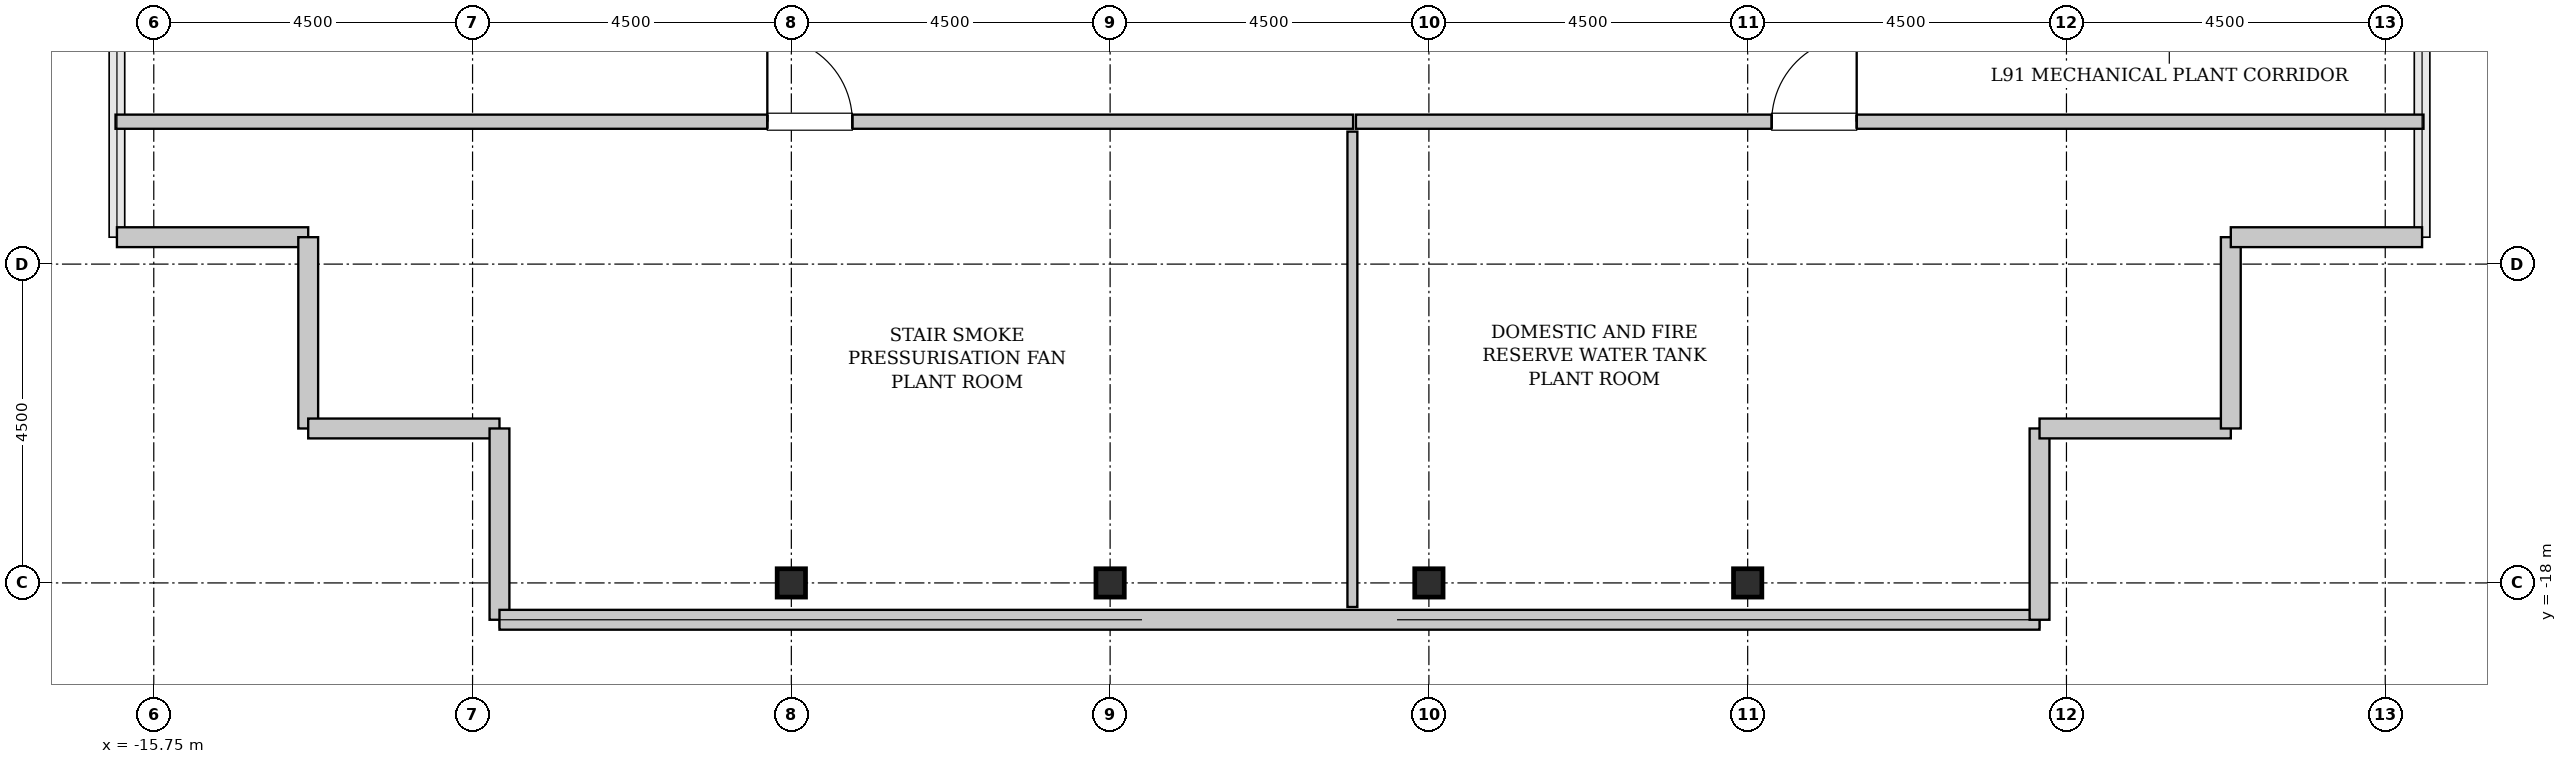
"""IFC4 building model, lengths in metres.
Left out: names, types, materials, properties, quantities, classifications, styles, units other than length and angle.
Written with IfcOpenShell. Run it as: python <this file> out.ifc"""

import sys

from ifc_helpers import new_model, si_unit, direction, frame, frame_2d, origin, origin_2d, place, context, subcontext, project, spatial, rectangle, hollow_rectangle, extrude, source, transform, mapped, element, fill, save


model = new_model("IFC4")
c1 = context("Model", 3, precision=1e-05, world=origin(), true_north=direction((0.0, 1.0)))
c2 = subcontext(c1, "Body", "Model", "MODEL_VIEW")
j1 = project(units=[si_unit("LENGTHUNIT", "METRE"), si_unit("PLANEANGLEUNIT", "RADIAN")], contexts=[c1])
p1 = place(None, origin())
s1 = spatial("IfcSite", under=j1, at=p1, CompositionType="ELEMENT")
p2 = place(p1, origin())
s2 = spatial("IfcBuilding", under=s1, at=p2, CompositionType="ELEMENT")
p3 = place(p2, frame((0.0, 0.0, 363.0)))
s3 = spatial("IfcBuildingStorey", under=s2, at=p3, CompositionType="ELEMENT", Elevation=363.0)
m1 = source(origin(), c2, "Body", "SweptSolid", [
    extrude(hollow_rectangle(XDim=0.4, YDim=0.4, WallThickness=0.02, InnerFilletRadius=0.02, OuterFilletRadius=0.04, at=origin_2d()), origin(), (0.0, 0.0, 1.0), 4.4),
])
for number, where, z_axis, x_axis in (
    (1, (-6.75, -18.0, 0.0), (0.0, 0.0, 1.0), (1.0, 0.0, 0.0)),
    (2, (-2.25, -18.0, 0.0), (0.0, 0.0, 1.0), (1.0, 0.0, 0.0)),
    (3, (2.25, -18.0, 0.0), (0.0, 0.0, 1.0), (1.0, 0.0, 0.0)),
    (4, (6.75, -18.0, 0.0), (0.0, 0.0, 1.0), (1.0, 0.0, 0.0)),
):
    element("IfcColumn", number, at=place(p3, frame(where, z_axis=z_axis, x_axis=x_axis)), inside=s3, PredefinedType="COLUMN", context=c2, shape_type="MappedRepresentation", body=[
        mapped(m1, transform((0.0, 0.0, 0.0), x_axis=(1.0, 0.0, 0.0), y_axis=(0.0, 1.0, 0.0), z_axis=(0.0, 0.0, 1.0), scale=1.0)),
    ])
m2 = source(origin(), c2, "Body", "SweptSolid", [
    extrude(rectangle(XDim=2.7, YDim=0.28, at=frame_2d((1.35, 0.0))), origin(), (0.0, 0.0, 1.0), 4.1),
])
for number, where, z_axis, x_axis in (
    (5, (-16.27, -13.12, 0.0), (0.0, 0.0, 1.0), (1.0, 0.0, 0.0)),
    (6, (-13.57, -13.12, 0.0), (0.0, 0.0, 1.0), (0.0, -1.0, 0.0)),
    (7, (-13.57, -15.82, 0.0), (0.0, 0.0, 1.0), (1.0, 0.0, 0.0)),
    (8, (-10.87, -15.82, 0.0), (0.0, 0.0, 1.0), (0.0, -1.0, 0.0)),
):
    element("IfcWall", number, at=place(p3, frame(where, z_axis=z_axis, x_axis=x_axis)), inside=s3, PredefinedType="SOLIDWALL", context=c2, shape_type="MappedRepresentation", body=[
        mapped(m2, transform((0.0, 0.0, 0.0), x_axis=(1.0, 0.0, 0.0), y_axis=(0.0, 1.0, 0.0), z_axis=(0.0, 0.0, 1.0), scale=1.0)),
    ])
m3 = source(origin(), c2, "Body", "SweptSolid", [
    extrude(rectangle(XDim=21.74, YDim=0.28, at=frame_2d((10.87, 0.0))), origin(), (0.0, 0.0, 1.0), 1.1),
])
p4 = place(p3, frame((-10.87, -18.52, 0.0), z_axis=(0.0, 0.0, 1.0), x_axis=(1.0, 0.0, 0.0)))
e9 = element("IfcWall", 9, at=p4, inside=s3, PredefinedType="SOLIDWALL", context=c2, shape_type="MappedRepresentation", body=[
    mapped(m3, transform((0.0, 0.0, 0.0), x_axis=(1.0, 0.0, 0.0), y_axis=(0.0, 1.0, 0.0), z_axis=(0.0, 0.0, 1.0), scale=1.0)),
])
for number, where, z_axis, x_axis in (
    (10, (10.87, -18.52, 0.0), (0.0, 0.0, 1.0), (0.0, 1.0, 0.0)),
    (11, (10.87, -15.82, 0.0), (0.0, 0.0, 1.0), (1.0, 0.0, 0.0)),
    (12, (13.57, -15.82, 0.0), (0.0, 0.0, 1.0), (0.0, 1.0, 0.0)),
    (13, (13.57, -13.12, 0.0), (0.0, 0.0, 1.0), (1.0, 0.0, 0.0)),
):
    element("IfcWall", number, at=place(p3, frame(where, z_axis=z_axis, x_axis=x_axis)), inside=s3, PredefinedType="SOLIDWALL", context=c2, shape_type="MappedRepresentation", body=[
        mapped(m2, transform((0.0, 0.0, 0.0), x_axis=(1.0, 0.0, 0.0), y_axis=(0.0, 1.0, 0.0), z_axis=(0.0, 0.0, 1.0), scale=1.0)),
    ])
m4 = source(origin(), c2, "Body", "SweptSolid", [
    extrude(rectangle(XDim=17.47, YDim=0.2, at=frame_2d((8.735, 0.0))), origin(), (0.0, 0.0, 1.0), 4.085),
])
p5 = place(p3, frame((-16.29, -11.49, 0.0), z_axis=(0.0, 0.0, 1.0), x_axis=(1.0, 0.0, 0.0)))
e14 = element("IfcWall", 14, at=p5, inside=s3, PredefinedType="SOLIDWALL", context=c2, shape_type="MappedRepresentation", body=[
    mapped(m4, transform((0.0, 0.0, 0.0), x_axis=(1.0, 0.0, 0.0), y_axis=(0.0, 1.0, 0.0), z_axis=(0.0, 0.0, 1.0), scale=1.0)),
])
p6 = place(p5, frame((9.201, 0.0, 0.0)))
e15 = element("IfcOpeningElement", 15, at=p6, cuts=e14, PredefinedType="OPENING", context=c2, shape_type="SweptSolid", body=[
    extrude(rectangle(XDim=1.2, YDim=2.15, at=frame_2d((0.6, 1.075))), frame((0.0, 0.11, 0.0), z_axis=(0.0, -1.0, 0.0), x_axis=(1.0, 0.0, 0.0)), (0.0, 0.0, 1.0), 0.22),
])
m5 = source(origin(), c2, "Body", "SweptSolid", [
    extrude(rectangle(XDim=6.71, YDim=0.14, at=frame_2d((3.355, 0.0))), origin(), (0.0, 0.0, 1.0), 4.085),
])
p7 = place(p3, frame((1.17, -18.34, 0.0), z_axis=(0.0, 0.0, 1.0), x_axis=(0.0, 1.0, 0.0)))
e16 = element("IfcWall", 16, at=p7, inside=s3, PredefinedType="PARTITIONING", context=c2, shape_type="MappedRepresentation", body=[
    mapped(m5, transform((0.0, 0.0, 0.0), x_axis=(1.0, 0.0, 0.0), y_axis=(0.0, 1.0, 0.0), z_axis=(0.0, 0.0, 1.0), scale=1.0)),
])
m6 = source(origin(), c2, "Body", "SweptSolid", [
    extrude(rectangle(XDim=15.07, YDim=0.2, at=frame_2d((7.535, 0.0))), origin(), (0.0, 0.0, 1.0), 4.085),
])
p8 = place(p3, frame((1.22, -11.49, 0.0), z_axis=(0.0, 0.0, 1.0), x_axis=(1.0, 0.0, 0.0)))
e17 = element("IfcWall", 17, at=p8, inside=s3, PredefinedType="SOLIDWALL", context=c2, shape_type="MappedRepresentation", body=[
    mapped(m6, transform((0.0, 0.0, 0.0), x_axis=(1.0, 0.0, 0.0), y_axis=(0.0, 1.0, 0.0), z_axis=(0.0, 0.0, 1.0), scale=1.0)),
])
p9 = place(p8, frame((5.869, 0.0, 0.0)))
e18 = element("IfcOpeningElement", 18, at=p9, cuts=e17, PredefinedType="OPENING", context=c2, shape_type="SweptSolid", body=[
    extrude(rectangle(XDim=1.2, YDim=2.15, at=frame_2d((0.6, 1.075))), frame((0.0, 0.11, 0.0), z_axis=(0.0, -1.0, 0.0), x_axis=(1.0, 0.0, 0.0)), (0.0, 0.0, 1.0), 0.22),
])
m7 = source(origin(), c2, "Body", "SweptSolid", [
    extrude(rectangle(XDim=1.2, YDim=2.15, at=frame_2d((0.6, 1.075))), frame((0.0, 0.025, 0.0), z_axis=(0.0, -1.0, 0.0), x_axis=(1.0, 0.0, 0.0)), (0.0, 0.0, 1.0), 0.05),
])
p10 = place(p6, origin())
e19 = element("IfcDoor", 19, at=p10, inside=s3, OperationType="SINGLE_SWING_LEFT", PredefinedType="DOOR", context=c2, shape_type="MappedRepresentation", body=[
    mapped(m7, transform((0.0, 0.0, 0.0), x_axis=(1.0, 0.0, 0.0), y_axis=(0.0, 1.0, 0.0), z_axis=(0.0, 0.0, 1.0), scale=1.0)),
])
fill(e15, e19)
p11 = place(p9, origin())
e20 = element("IfcDoor", 20, at=p11, inside=s3, OperationType="SINGLE_SWING_RIGHT", PredefinedType="DOOR", context=c2, shape_type="MappedRepresentation", body=[
    mapped(m7, transform((0.0, 0.0, 0.0), x_axis=(1.0, 0.0, 0.0), y_axis=(0.0, 1.0, 0.0), z_axis=(0.0, 0.0, 1.0), scale=1.0)),
])
fill(e18, e20)
save(model, sys.argv[1])
